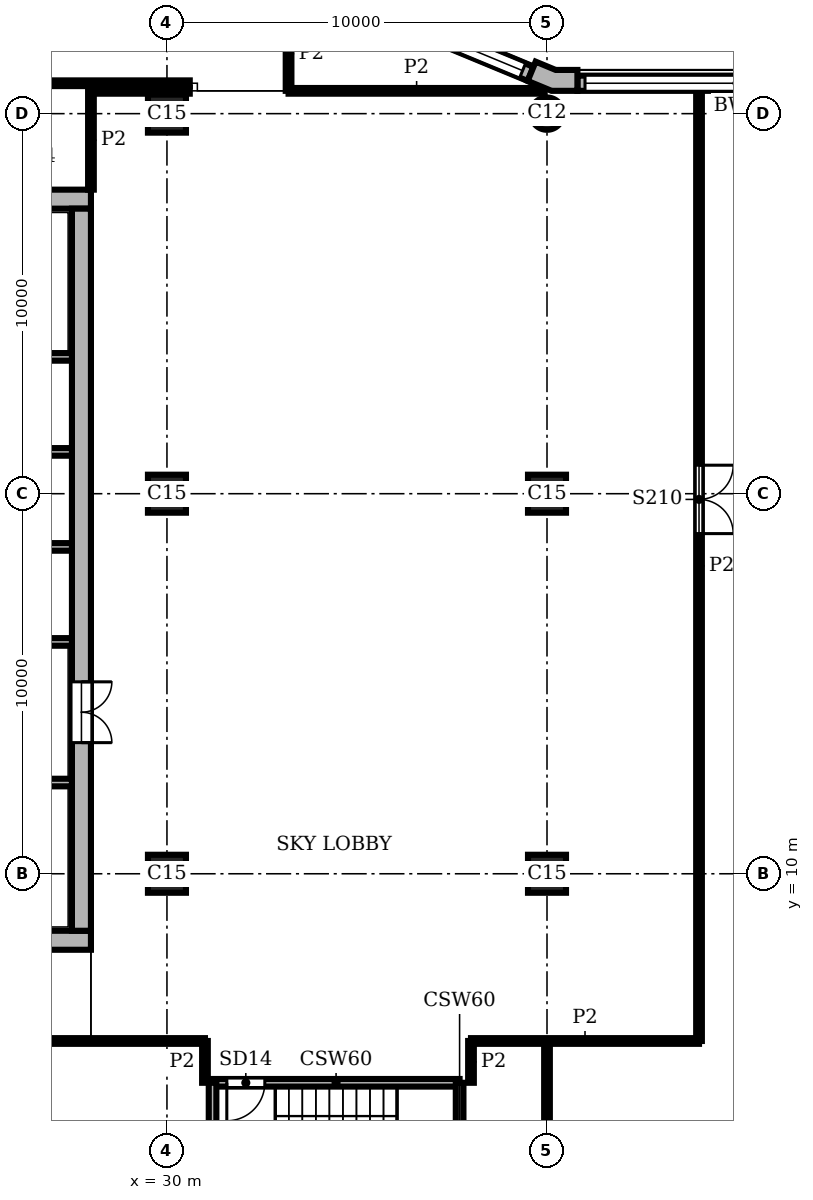
"""IFC4 building model, lengths in metres.
Left out: names, types, materials, properties, quantities, classifications, styles, units other than length and angle.
Written with IfcOpenShell. Run it as: python <this file> out.ifc"""

import sys

from ifc_helpers import new_model, si_unit, direction, frame, frame_2d, origin, origin_2d, place, context, subcontext, project, spatial, polyline, rectangle, circle, outline, extrude, element, fill, save


model = new_model("IFC4")
c1 = context("Model", 3, precision=1e-05, world=origin(), true_north=direction((0.0, 1.0)))
c2 = subcontext(c1, "Body", "Model", "MODEL_VIEW")
j1 = project(units=[si_unit("LENGTHUNIT", "METRE"), si_unit("PLANEANGLEUNIT", "RADIAN")], contexts=[c1])
p1 = place(None, origin())
s1 = spatial("IfcSite", under=j1, at=p1, CompositionType="ELEMENT")
p2 = place(p1, origin())
s2 = spatial("IfcBuilding", under=s1, at=p2, CompositionType="ELEMENT")
p3 = place(p2, frame((0.0, 0.0, 246.0)))
s3 = spatial("IfcBuildingStorey", under=s2, at=p3, CompositionType="ELEMENT", Elevation=246.0)
p4 = place(p3, frame((40.0, 30.0, 0.0), z_axis=(0.0, 0.0, 1.0), x_axis=(1.0, 0.0, 0.0)))
e1 = element("IfcColumn", 1, at=p4, inside=s3, PredefinedType="COLUMN", context=c2, shape_type="SweptSolid", body=[
    extrude(circle(Radius=0.425, at=origin_2d()), origin(), (0.0, 0.0, 1.0), 5.4),
])
for number, where, z_axis, x_axis in (
    (2, (30.0, 10.0, 0.0), (0.0, 0.0, 1.0), (1.0, 0.0, 0.0)),
    (3, (30.0, 20.0, 0.0), (0.0, 0.0, 1.0), (1.0, 0.0, 0.0)),
    (4, (30.0, 30.0, 0.0), (0.0, 0.0, 1.0), (1.0, 0.0, 0.0)),
    (5, (40.0, 10.0, 0.0), (0.0, 0.0, 1.0), (1.0, 0.0, 0.0)),
    (6, (40.0, 20.0, 0.0), (0.0, 0.0, 1.0), (1.0, 0.0, 0.0)),
):
    element("IfcColumn", number, at=place(p3, frame(where, z_axis=z_axis, x_axis=x_axis)), inside=s3, PredefinedType="COLUMN", context=c2, shape_type="SweptSolid", body=[
        extrude(rectangle(XDim=1.0, YDim=1.0, at=origin_2d()), origin(), (0.0, 0.0, 1.0), 5.4),
    ])
p5 = place(p3, frame((8.0, 8.25, 0.0), z_axis=(0.0, 0.0, 1.0), x_axis=(1.0, 0.0, 0.0)))
e7 = element("IfcWall", 7, at=p5, inside=s3, PredefinedType="SHEAR", context=c2, shape_type="SweptSolid", body=[
    extrude(rectangle(XDim=20.0, YDim=0.5, at=frame_2d((10.0, 0.0))), origin(), (0.0, 0.0, 1.0), 5.4),
])
p6 = place(p3, frame((27.75, 8.5, 0.0), z_axis=(0.0, 0.0, 1.0), x_axis=(0.0, 1.0, 0.0)))
e8 = element("IfcWall", 8, at=p6, inside=s3, PredefinedType="SHEAR", context=c2, shape_type="SweptSolid", body=[
    extrude(rectangle(XDim=19.0, YDim=0.5, at=frame_2d((9.5, 0.0))), origin(), (0.0, 0.0, 1.0), 5.4),
])
p7 = place(p6, frame((4.95, 0.0, 0.0)))
e9 = element("IfcOpeningElement", 9, at=p7, cuts=e8, PredefinedType="OPENING", context=c2, shape_type="SweptSolid", body=[
    extrude(rectangle(XDim=1.6, YDim=2.1, at=frame_2d((0.8, 1.05))), frame((0.0, 0.26, 0.0), z_axis=(0.0, -1.0, 0.0), x_axis=(1.0, 0.0, 0.0)), (0.0, 0.0, 1.0), 0.52),
])
p8 = place(p3, frame((28.0, 27.75, 0.0), z_axis=(0.0, 0.0, 1.0), x_axis=(-1.0, 0.0, 0.0)))
e10 = element("IfcWall", 10, at=p8, inside=s3, PredefinedType="SHEAR", context=c2, shape_type="SweptSolid", body=[
    extrude(rectangle(XDim=20.0, YDim=0.5, at=frame_2d((10.0, 0.0))), origin(), (0.0, 0.0, 1.0), 5.4),
])
p9 = place(p3, origin())
e11 = element("IfcWall", 11, at=p9, inside=s3, PredefinedType="SOLIDWALL", context=c2, shape_type="SweptSolid", body=[
    extrude(outline(polyline([(40.8, 31.0), (40.8, 31.15), (40.229, 31.15), (39.701, 31.369), (39.644, 31.23), (39.49, 30.861), (40.119, 30.6), (40.8, 30.6), (40.8, 31.0)])), origin(), (0.0, 0.0, 1.0), 5.4),
])
p10 = place(p3, frame((49.2, 30.8, 0.0), z_axis=(0.0, 0.0, 1.0), x_axis=(-1.0, 0.0, 0.0)))
e12 = element("IfcWall", 12, at=p10, inside=s3, PredefinedType="SOLIDWALL", context=c2, shape_type="SweptSolid", body=[
    extrude(rectangle(XDim=8.4, YDim=0.4, at=frame_2d((4.2, 0.0))), origin(), (0.0, 0.0, 1.0), 5.4),
])
p11 = place(p10, frame((0.2, 0.0, 0.9)))
e13 = element("IfcOpeningElement", 13, at=p11, cuts=e12, PredefinedType="OPENING", context=c2, shape_type="SweptSolid", body=[
    extrude(rectangle(XDim=8.0, YDim=3.4, at=frame_2d((4.0, 1.7))), frame((0.0, 0.21, 0.0), z_axis=(0.0, -1.0, 0.0), x_axis=(1.0, 0.0, 0.0)), (0.0, 0.0, 1.0), 0.42),
])
p12 = place(p3, frame((39.567, 31.045, 0.0), z_axis=(0.0, 0.0, 1.0), x_axis=(-0.923891000409, 0.382655745237, 0.0)))
e14 = element("IfcWall", 14, at=p12, inside=s3, PredefinedType="SOLIDWALL", context=c2, shape_type="SweptSolid", body=[
    extrude(rectangle(XDim=6.053, YDim=0.4, at=frame_2d((3.027, 0.0))), origin(), (0.0, 0.0, 1.0), 5.4),
])
p13 = place(p12, frame((0.227, 0.0, 0.9)))
e15 = element("IfcOpeningElement", 15, at=p13, cuts=e14, PredefinedType="OPENING", context=c2, shape_type="SweptSolid", body=[
    extrude(rectangle(XDim=5.6, YDim=3.4, at=frame_2d((2.8, 1.7))), frame((0.0, 0.21, 0.0), z_axis=(0.0, -1.0, 0.0), x_axis=(1.0, 0.0, 0.0)), (0.0, 0.0, 1.0), 0.42),
])
p14 = place(p3, frame((31.2, 4.5, 0.0), z_axis=(0.0, 0.0, 1.0), x_axis=(1.0, 0.0, 0.0)))
e16 = element("IfcWall", 16, at=p14, inside=s3, PredefinedType="SHEAR", context=c2, shape_type="SweptSolid", body=[
    extrude(rectangle(XDim=6.5, YDim=0.2, at=frame_2d((3.25, 0.0))), origin(), (0.0, 0.0, 1.0), 5.08),
])
p15 = place(p14, frame((0.375, 0.0, 0.0)))
e17 = element("IfcOpeningElement", 17, at=p15, cuts=e16, PredefinedType="OPENING", context=c2, shape_type="SweptSolid", body=[
    extrude(rectangle(XDim=1.0, YDim=2.1, at=frame_2d((0.5, 1.05))), frame((0.0, 0.11, 0.0), z_axis=(0.0, -1.0, 0.0), x_axis=(1.0, 0.0, 0.0)), (0.0, 0.0, 1.0), 0.22),
])
p16 = place(p3, frame((13.8, 12.4, 0.0), z_axis=(0.0, 0.0, 1.0), x_axis=(1.0, 0.0, 0.0)))
e18 = element("IfcWall", 18, at=p16, inside=s3, PredefinedType="SHEAR", context=c2, shape_type="SweptSolid", body=[
    extrude(rectangle(XDim=13.7, YDim=0.2, at=frame_2d((6.85, 0.0))), origin(), (0.0, 0.0, 1.0), 5.08),
])
p17 = place(p16, frame((2.4, 0.0, 0.0)))
e19 = element("IfcOpeningElement", 19, at=p17, cuts=e18, PredefinedType="OPENING", context=c2, shape_type="SweptSolid", body=[
    extrude(rectangle(XDim=1.1, YDim=2.1, at=frame_2d((0.55, 1.05))), frame((0.0, 0.11, 0.0), z_axis=(0.0, -1.0, 0.0), x_axis=(1.0, 0.0, 0.0)), (0.0, 0.0, 1.0), 0.22),
])
p18 = place(p16, frame((4.9, 0.0, 0.0)))
e20 = element("IfcOpeningElement", 20, at=p18, cuts=e18, PredefinedType="OPENING", context=c2, shape_type="SweptSolid", body=[
    extrude(rectangle(XDim=1.1, YDim=2.1, at=frame_2d((0.55, 1.05))), frame((0.0, 0.11, 0.0), z_axis=(0.0, -1.0, 0.0), x_axis=(1.0, 0.0, 0.0)), (0.0, 0.0, 1.0), 0.22),
])
p19 = place(p16, frame((0.15, 0.0, 0.0)))
e21 = element("IfcOpeningElement", 21, at=p19, cuts=e18, PredefinedType="OPENING", context=c2, shape_type="SweptSolid", body=[
    extrude(rectangle(XDim=1.0, YDim=2.1, at=frame_2d((0.5, 1.05))), frame((0.0, 0.11, 0.0), z_axis=(0.0, -1.0, 0.0), x_axis=(1.0, 0.0, 0.0)), (0.0, 0.0, 1.0), 0.22),
])
for number, where, z_axis, x_axis in (
    (22, (24.3, 16.1, 0.0), (0.0, 0.0, 1.0), (1.0, 0.0, 0.0)),
    (23, (24.3, 18.6, 0.0), (0.0, 0.0, 1.0), (1.0, 0.0, 0.0)),
    (24, (24.3, 21.1, 0.0), (0.0, 0.0, 1.0), (1.0, 0.0, 0.0)),
):
    element("IfcWall", number, at=place(p3, frame(where, z_axis=z_axis, x_axis=x_axis)), inside=s3, PredefinedType="SHEAR", context=c2, shape_type="SweptSolid", body=[
        extrude(rectangle(XDim=3.2, YDim=0.2, at=frame_2d((1.6, 0.0))), origin(), (0.0, 0.0, 1.0), 5.08),
    ])
p20 = place(p3, frame((13.8, 23.6, 0.0), z_axis=(0.0, 0.0, 1.0), x_axis=(1.0, 0.0, 0.0)))
e25 = element("IfcWall", 25, at=p20, inside=s3, PredefinedType="SHEAR", context=c2, shape_type="SweptSolid", body=[
    extrude(rectangle(XDim=13.7, YDim=0.2, at=frame_2d((6.85, 0.0))), origin(), (0.0, 0.0, 1.0), 5.08),
])
p21 = place(p20, frame((2.4, 0.0, 0.0)))
e26 = element("IfcOpeningElement", 26, at=p21, cuts=e25, PredefinedType="OPENING", context=c2, shape_type="SweptSolid", body=[
    extrude(rectangle(XDim=1.1, YDim=2.1, at=frame_2d((0.55, 1.05))), frame((0.0, 0.11, 0.0), z_axis=(0.0, -1.0, 0.0), x_axis=(1.0, 0.0, 0.0)), (0.0, 0.0, 1.0), 0.22),
])
p22 = place(p20, frame((4.9, 0.0, 0.0)))
e27 = element("IfcOpeningElement", 27, at=p22, cuts=e25, PredefinedType="OPENING", context=c2, shape_type="SweptSolid", body=[
    extrude(rectangle(XDim=1.1, YDim=2.1, at=frame_2d((0.55, 1.05))), frame((0.0, 0.11, 0.0), z_axis=(0.0, -1.0, 0.0), x_axis=(1.0, 0.0, 0.0)), (0.0, 0.0, 1.0), 0.22),
])
p23 = place(p20, frame((0.15, 0.0, 0.0)))
e28 = element("IfcOpeningElement", 28, at=p23, cuts=e25, PredefinedType="OPENING", context=c2, shape_type="SweptSolid", body=[
    extrude(rectangle(XDim=1.0, YDim=2.1, at=frame_2d((0.5, 1.05))), frame((0.0, 0.11, 0.0), z_axis=(0.0, -1.0, 0.0), x_axis=(1.0, 0.0, 0.0)), (0.0, 0.0, 1.0), 0.22),
])
for number, where, z_axis, x_axis in (
    (29, (31.2, 1.2, 0.0), (0.0, 0.0, 1.0), (0.0, 1.0, 0.0)),
    (30, (37.7, 1.2, 0.0), (0.0, 0.0, 1.0), (0.0, 1.0, 0.0)),
):
    element("IfcWall", number, at=place(p3, frame(where, z_axis=z_axis, x_axis=x_axis)), inside=s3, PredefinedType="SHEAR", context=c2, shape_type="SweptSolid", body=[
        extrude(rectangle(XDim=3.3, YDim=0.2, at=frame_2d((1.65, 0.0))), origin(), (0.0, 0.0, 1.0), 5.08),
    ])
p24 = place(p3, frame((28.0, 28.0, 0.0), z_axis=(0.0, 0.0, 1.0), x_axis=(0.0, 1.0, 0.0)))
e31 = element("IfcWall", 31, at=p24, inside=s3, PredefinedType="PARTITIONING", context=c2, shape_type="SweptSolid", body=[
    extrude(rectangle(XDim=2.598, YDim=0.15, at=frame_2d((1.299, 0.0))), origin(), (0.0, 0.0, 1.0), 5.08),
])
p25 = place(p3, frame((31.0, 4.5, 0.0), z_axis=(0.0, 0.0, 1.0), x_axis=(0.0, 1.0, 0.0)))
e32 = element("IfcWall", 32, at=p25, inside=s3, PredefinedType="PARTITIONING", context=c2, shape_type="SweptSolid", body=[
    extrude(rectangle(XDim=1.1, YDim=0.15, at=frame_2d((0.55, 0.0))), origin(), (0.0, 0.0, 1.0), 5.08),
])
p26 = place(p3, frame((33.2, 30.6, 0.0), z_axis=(0.0, 0.0, 1.0), x_axis=(0.0, 1.0, 0.0)))
e33 = element("IfcWall", 33, at=p26, inside=s3, PredefinedType="PARTITIONING", context=c2, shape_type="SweptSolid", body=[
    extrude(rectangle(XDim=1.952, YDim=0.15, at=frame_2d((0.976, 0.0))), origin(), (0.0, 0.0, 1.0), 5.08),
])
p27 = place(p3, frame((38.0, 4.5, 0.0), z_axis=(0.0, 0.0, 1.0), x_axis=(0.0, 1.0, 0.0)))
e34 = element("IfcWall", 34, at=p27, inside=s3, PredefinedType="PARTITIONING", context=c2, shape_type="SweptSolid", body=[
    extrude(rectangle(XDim=1.1, YDim=0.15, at=frame_2d((0.55, 0.0))), origin(), (0.0, 0.0, 1.0), 5.08),
])
p28 = place(p3, frame((40.0, 0.4, 0.0), z_axis=(0.0, 0.0, 1.0), x_axis=(0.0, 1.0, 0.0)))
e35 = element("IfcWall", 35, at=p28, inside=s3, PredefinedType="PARTITIONING", context=c2, shape_type="SweptSolid", body=[
    extrude(rectangle(XDim=5.2, YDim=0.15, at=frame_2d((2.6, 0.0))), origin(), (0.0, 0.0, 1.0), 5.08),
])
p29 = place(p3, frame((44.0, 5.6, 0.0), z_axis=(0.0, 0.0, 1.0), x_axis=(0.0, 1.0, 0.0)))
e36 = element("IfcWall", 36, at=p29, inside=s3, PredefinedType="PARTITIONING", context=c2, shape_type="SweptSolid", body=[
    extrude(rectangle(XDim=25.0, YDim=0.15, at=frame_2d((12.5, 0.0))), origin(), (0.0, 0.0, 1.0), 5.08),
])
p30 = place(p29, frame((13.35, 0.0, 0.0)))
e37 = element("IfcOpeningElement", 37, at=p30, cuts=e36, PredefinedType="OPENING", context=c2, shape_type="SweptSolid", body=[
    extrude(rectangle(XDim=1.8, YDim=2.1, at=frame_2d((0.9, 1.05))), frame((0.0, 0.085, 0.0), z_axis=(0.0, -1.0, 0.0), x_axis=(1.0, 0.0, 0.0)), (0.0, 0.0, 1.0), 0.17),
])
p31 = place(p3, frame((5.6, 5.6, 0.0), z_axis=(0.0, 0.0, 1.0), x_axis=(1.0, 0.0, 0.0)))
e38 = element("IfcWall", 38, at=p31, inside=s3, PredefinedType="PARTITIONING", context=c2, shape_type="SweptSolid", body=[
    extrude(rectangle(XDim=25.4, YDim=0.15, at=frame_2d((12.7, 0.0))), origin(), (0.0, 0.0, 1.0), 5.08),
])
p32 = place(p31, frame((3.6, 0.0, 0.0)))
e39 = element("IfcOpeningElement", 39, at=p32, cuts=e38, PredefinedType="OPENING", context=c2, shape_type="SweptSolid", body=[
    extrude(rectangle(XDim=1.0, YDim=2.1, at=frame_2d((0.5, 1.05))), frame((0.0, 0.085, 0.0), z_axis=(0.0, -1.0, 0.0), x_axis=(1.0, 0.0, 0.0)), (0.0, 0.0, 1.0), 0.17),
])
p33 = place(p31, frame((11.25, 0.0, 0.0)))
e40 = element("IfcOpeningElement", 40, at=p33, cuts=e38, PredefinedType="OPENING", context=c2, shape_type="SweptSolid", body=[
    extrude(rectangle(XDim=0.8, YDim=2.1, at=frame_2d((0.4, 1.05))), frame((0.0, 0.085, 0.0), z_axis=(0.0, -1.0, 0.0), x_axis=(1.0, 0.0, 0.0)), (0.0, 0.0, 1.0), 0.17),
])
p34 = place(p31, frame((18.25, 0.0, 0.0)))
e41 = element("IfcOpeningElement", 41, at=p34, cuts=e38, PredefinedType="OPENING", context=c2, shape_type="SweptSolid", body=[
    extrude(rectangle(XDim=1.0, YDim=2.1, at=frame_2d((0.5, 1.05))), frame((0.0, 0.085, 0.0), z_axis=(0.0, -1.0, 0.0), x_axis=(1.0, 0.0, 0.0)), (0.0, 0.0, 1.0), 0.17),
])
p35 = place(p3, frame((38.0, 5.6, 0.0), z_axis=(0.0, 0.0, 1.0), x_axis=(1.0, 0.0, 0.0)))
e42 = element("IfcWall", 42, at=p35, inside=s3, PredefinedType="PARTITIONING", context=c2, shape_type="SweptSolid", body=[
    extrude(rectangle(XDim=6.0, YDim=0.15, at=frame_2d((3.0, 0.0))), origin(), (0.0, 0.0, 1.0), 5.08),
])
p36 = place(p3, frame((28.002, 30.6, 0.0), z_axis=(0.0, 0.0, 1.0), x_axis=(1.0, 0.0, 0.0)))
e43 = element("IfcWall", 43, at=p36, inside=s3, PredefinedType="PARTITIONING", context=c2, shape_type="SweptSolid", body=[
    extrude(rectangle(XDim=2.598, YDim=0.15, at=frame_2d((1.299, 0.0))), origin(), (0.0, 0.0, 1.0), 5.08),
])
p37 = place(p3, frame((33.2, 30.6, 0.0), z_axis=(0.0, 0.0, 1.0), x_axis=(1.0, 0.0, 0.0)))
e44 = element("IfcWall", 44, at=p37, inside=s3, PredefinedType="PARTITIONING", context=c2, shape_type="SweptSolid", body=[
    extrude(rectangle(XDim=6.738, YDim=0.15, at=frame_2d((3.369, 0.0))), origin(), (0.0, 0.0, 1.0), 5.08),
])
p38 = place(p3, frame((13.802, 30.8, 0.0), z_axis=(0.0, 0.0, 1.0), x_axis=(1.0, 0.0, 0.0)))
e45 = element("IfcWall", 45, at=p38, inside=s3, PredefinedType="PARTITIONING", context=c2, shape_type="SweptSolid", body=[
    extrude(rectangle(XDim=16.798, YDim=0.15, at=frame_2d((8.399, 0.0))), origin(), (0.0, 0.0, 1.0), 5.08),
])
p39 = place(p38, frame((4.6, 0.0, 0.0)))
e46 = element("IfcOpeningElement", 46, at=p39, cuts=e45, PredefinedType="OPENING", context=c2, shape_type="SweptSolid", body=[
    extrude(rectangle(XDim=1.0, YDim=2.1, at=frame_2d((0.5, 1.05))), frame((0.0, 0.085, 0.0), z_axis=(0.0, -1.0, 0.0), x_axis=(1.0, 0.0, 0.0)), (0.0, 0.0, 1.0), 0.17),
])
p40 = place(p11, origin())
e47 = element("IfcWindow", 47, at=p40, inside=s3, PartitioningType="SINGLE_PANEL", PredefinedType="WINDOW", context=c2, shape_type="SweptSolid", body=[
    extrude(rectangle(XDim=8.0, YDim=3.4, at=frame_2d((4.0, 1.7))), frame((0.0, 0.16, 0.0), z_axis=(0.0, -1.0, 0.0), x_axis=(1.0, 0.0, 0.0)), (0.0, 0.0, 1.0), 0.06),
])
fill(e13, e47)
p41 = place(p13, origin())
e48 = element("IfcWindow", 48, at=p41, inside=s3, PartitioningType="SINGLE_PANEL", PredefinedType="WINDOW", context=c2, shape_type="SweptSolid", body=[
    extrude(rectangle(XDim=5.6, YDim=3.4, at=frame_2d((2.8, 1.7))), frame((0.0, 0.16, 0.0), z_axis=(0.0, -1.0, 0.0), x_axis=(1.0, 0.0, 0.0)), (0.0, 0.0, 1.0), 0.06),
])
fill(e15, e48)
p42 = place(p15, frame((1.0, 0.0, 0.0), z_axis=(0.0, 0.0, 1.0), x_axis=(-1.0, 0.0, 0.0)))
e49 = element("IfcDoor", 49, at=p42, inside=s3, OperationType="SINGLE_SWING_RIGHT", PredefinedType="DOOR", context=c2, shape_type="SweptSolid", body=[
    extrude(rectangle(XDim=1.0, YDim=2.1, at=frame_2d((0.5, 1.05))), frame((0.0, 0.025, 0.0), z_axis=(0.0, -1.0, 0.0), x_axis=(1.0, 0.0, 0.0)), (0.0, 0.0, 1.0), 0.05),
])
fill(e17, e49)
p43 = place(p7, frame((1.6, 0.0, 0.0), z_axis=(0.0, 0.0, 1.0), x_axis=(-1.0, 0.0, 0.0)))
e50 = element("IfcDoor", 50, at=p43, inside=s3, OperationType="DOUBLE_DOOR_SINGLE_SWING", PredefinedType="DOOR", context=c2, shape_type="SweptSolid", body=[
    extrude(rectangle(XDim=1.6, YDim=2.1, at=frame_2d((0.8, 1.05))), frame((0.0, 0.025, 0.0), z_axis=(0.0, -1.0, 0.0), x_axis=(1.0, 0.0, 0.0)), (0.0, 0.0, 1.0), 0.05),
])
fill(e9, e50)
p44 = place(p30, frame((1.8, 0.0, 0.0), z_axis=(0.0, 0.0, 1.0), x_axis=(-1.0, 0.0, 0.0)))
e51 = element("IfcDoor", 51, at=p44, inside=s3, OperationType="DOUBLE_DOOR_SINGLE_SWING", PredefinedType="DOOR", context=c2, shape_type="SweptSolid", body=[
    extrude(rectangle(XDim=1.8, YDim=2.1, at=frame_2d((0.9, 1.05))), frame((0.0, 0.025, 0.0), z_axis=(0.0, -1.0, 0.0), x_axis=(1.0, 0.0, 0.0)), (0.0, 0.0, 1.0), 0.05),
])
fill(e37, e51)
save(model, sys.argv[1])
